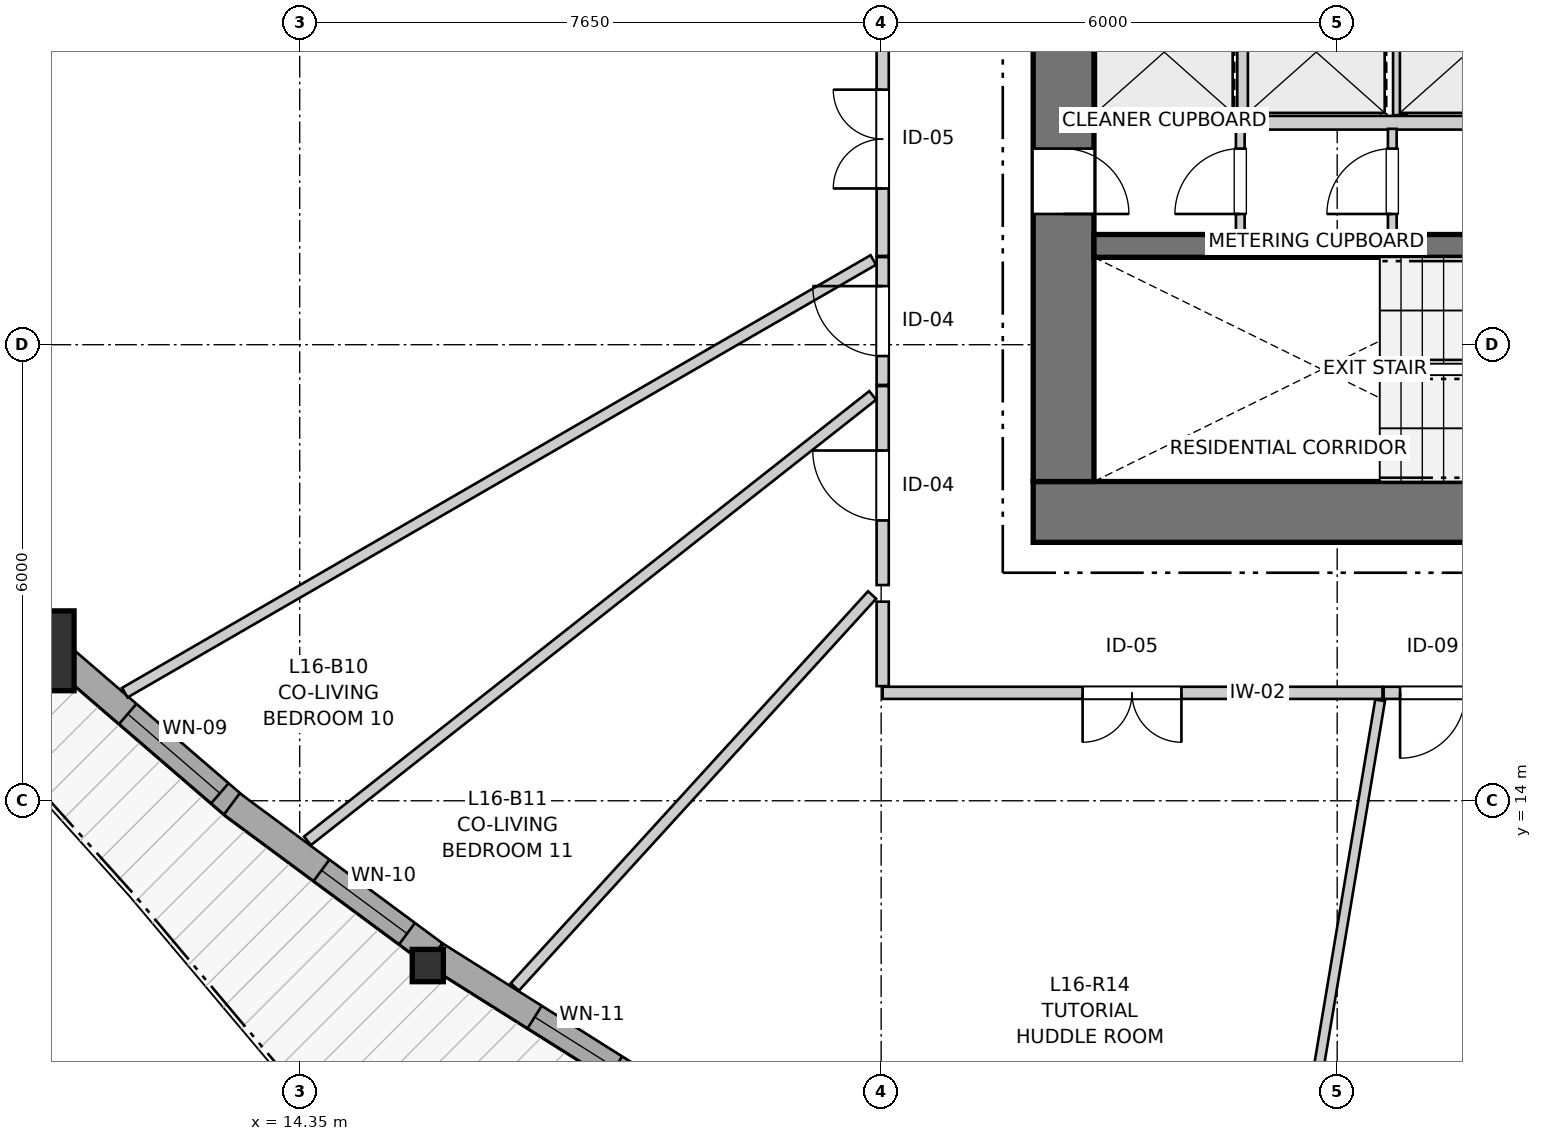
"""IFC4 building model, lengths in metres.
Left out: names, types, materials, properties, quantities, classifications, styles, units other than length and angle.
Written with IfcOpenShell. Run it as: python <this file> out.ifc"""

import sys

from ifc_helpers import new_model, si_unit, direction, frame, frame_2d, origin, origin_2d, place, context, subcontext, project, spatial, rectangle, i_section, extrude, source, transform, mapped, element, fill, save


model = new_model("IFC4")
c1 = context("Model", 3, precision=1e-05, world=origin(), true_north=direction((0.0, 1.0)))
c2 = subcontext(c1, "Body", "Model", "MODEL_VIEW")
j1 = project(units=[si_unit("LENGTHUNIT", "METRE"), si_unit("PLANEANGLEUNIT", "RADIAN")], contexts=[c1])
p1 = place(None, origin())
s1 = spatial("IfcSite", under=j1, at=p1, CompositionType="ELEMENT")
p2 = place(p1, origin())
s2 = spatial("IfcBuilding", under=s1, at=p2, CompositionType="ELEMENT")
p3 = place(p2, frame((0.0, 0.0, 55.8)))
s3 = spatial("IfcBuildingStorey", under=s2, at=p3, CompositionType="ELEMENT", Elevation=55.8)
p4 = place(p3, frame((24.0, 17.8, 0.0), z_axis=(0.0, 0.0, 1.0), x_axis=(1.0, 0.0, 0.0)))
e1 = element("IfcWall", 1, at=p4, inside=s3, PredefinedType="SHEAR", context=c2, shape_type="SweptSolid", body=[
    extrude(rectangle(XDim=12.7, YDim=0.8, at=frame_2d((6.35, 0.0))), origin(), (0.0, 0.0, 1.0), 2.94),
])
p5 = place(p3, frame((24.4, 33.8, 0.0), z_axis=(0.0, 0.0, 1.0), x_axis=(0.0, -1.0, 0.0)))
e2 = element("IfcWall", 2, at=p5, inside=s3, PredefinedType="SHEAR", context=c2, shape_type="SweptSolid", body=[
    extrude(rectangle(XDim=15.6, YDim=0.8, at=frame_2d((7.8, 0.0))), origin(), (0.0, 0.0, 1.0), 2.94),
])
p6 = place(p5, frame((7.05, 0.0, 0.0)))
e3 = element("IfcOpeningElement", 3, at=p6, cuts=e2, PredefinedType="OPENING", context=c2, shape_type="SweptSolid", body=[
    extrude(rectangle(XDim=1.5, YDim=2.15, at=frame_2d((0.75, 1.075))), frame((0.0, 0.41, 0.0), z_axis=(0.0, -1.0, 0.0), x_axis=(1.0, 0.0, 0.0)), (0.0, 0.0, 1.0), 0.82),
])
p7 = place(p5, frame((3.52, 0.0, 0.0)))
e4 = element("IfcOpeningElement", 4, at=p7, cuts=e2, PredefinedType="OPENING", context=c2, shape_type="SweptSolid", body=[
    extrude(rectangle(XDim=0.86, YDim=2.05, at=frame_2d((0.43, 1.025))), frame((0.0, 0.41, 0.0), z_axis=(0.0, -1.0, 0.0), x_axis=(1.0, 0.0, 0.0)), (0.0, 0.0, 1.0), 0.82),
])
p8 = place(p5, frame((11.22, 0.0, 0.0)))
e5 = element("IfcOpeningElement", 5, at=p8, cuts=e2, PredefinedType="OPENING", context=c2, shape_type="SweptSolid", body=[
    extrude(rectangle(XDim=0.86, YDim=2.05, at=frame_2d((0.43, 1.025))), frame((0.0, 0.41, 0.0), z_axis=(0.0, -1.0, 0.0), x_axis=(1.0, 0.0, 0.0)), (0.0, 0.0, 1.0), 0.82),
])
p9 = place(p3, frame((24.8, 21.3, 0.0), z_axis=(0.0, 0.0, 1.0), x_axis=(1.0, 0.0, 0.0)))
e6 = element("IfcWall", 6, at=p9, inside=s3, PredefinedType="SHEAR", context=c2, shape_type="SweptSolid", body=[
    extrude(rectangle(XDim=11.1, YDim=0.3, at=frame_2d((5.55, 0.0))), origin(), (0.0, 0.0, 1.0), 2.94),
])
p10 = place(p9, frame((6.22, 0.0, 0.0)))
e7 = element("IfcOpeningElement", 7, at=p10, cuts=e6, PredefinedType="OPENING", context=c2, shape_type="SweptSolid", body=[
    extrude(rectangle(XDim=0.98, YDim=2.15, at=frame_2d((0.49, 1.075))), frame((0.0, 0.16, 0.0), z_axis=(0.0, -1.0, 0.0), x_axis=(1.0, 0.0, 0.0)), (0.0, 0.0, 1.0), 0.32),
])
p11 = place(p9, frame((9.15, 0.0, 0.0)))
e8 = element("IfcOpeningElement", 8, at=p11, cuts=e6, PredefinedType="OPENING", context=c2, shape_type="SweptSolid", body=[
    extrude(rectangle(XDim=1.15, YDim=2.15, at=frame_2d((0.575, 1.075))), frame((0.0, 0.16, 0.0), z_axis=(0.0, -1.0, 0.0), x_axis=(1.0, 0.0, 0.0)), (0.0, 0.0, 1.0), 0.32),
])
m1 = source(origin(), c2, "Body", "SweptSolid", [
    extrude(rectangle(XDim=1.05, YDim=1.05, at=origin_2d()), origin(), (0.0, 0.0, 1.0), 2.94),
])
p12 = place(p3, frame((10.856, 15.973, 0.0), z_axis=(0.0, 0.0, 1.0), x_axis=(1.0, 0.0, 0.0)))
e9 = element("IfcColumn", 9, at=p12, inside=s3, PredefinedType="COLUMN", context=c2, shape_type="MappedRepresentation", body=[
    mapped(m1, transform((0.0, 0.0, 0.0), x_axis=(1.0, 0.0, 0.0), y_axis=(0.0, 1.0, 0.0), z_axis=(0.0, 0.0, 1.0), scale=1.0)),
])
m2 = source(origin(), c2, "Body", "SweptSolid", [
    extrude(i_section(OverallWidth=0.409, OverallDepth=0.425, WebThickness=0.03, FlangeThickness=0.048, FilletRadius=0.015, at=origin_2d()), origin(), (0.0, 0.0, 1.0), 2.94),
])
p13 = place(p3, frame((16.035, 11.832, 0.0), z_axis=(0.0, 0.0, 1.0), x_axis=(1.0, 0.0, 0.0)))
e10 = element("IfcColumn", 10, at=p13, inside=s3, PredefinedType="PILASTER", context=c2, shape_type="MappedRepresentation", body=[
    mapped(m2, transform((0.0, 0.0, 0.0), x_axis=(1.0, 0.0, 0.0), y_axis=(0.0, 1.0, 0.0), z_axis=(0.0, 0.0, 1.0), scale=1.0)),
])
p14 = place(p3, frame((11.198, 15.91, 0.0), z_axis=(0.0, 0.0, 1.0), x_axis=(0.757460062477, -0.652881500544, 0.0)))
e11 = element("IfcWall", 11, at=p14, inside=s3, PredefinedType="SOLIDWALL", context=c2, shape_type="SweptSolid", body=[
    extrude(rectangle(XDim=3.074, YDim=0.35, at=frame_2d((1.537, 0.0))), origin(), (0.0, 0.0, 1.0), 2.42),
])
p15 = place(p14, frame((1.175, 0.0, 0.82)))
e12 = element("IfcOpeningElement", 12, at=p15, cuts=e11, PredefinedType="OPENING", context=c2, shape_type="SweptSolid", body=[
    extrude(rectangle(XDim=1.6, YDim=1.35, at=frame_2d((0.8, 0.675))), frame((0.0, 0.185, 0.0), z_axis=(0.0, -1.0, 0.0), x_axis=(1.0, 0.0, 0.0)), (0.0, 0.0, 1.0), 0.37),
])
p16 = place(p3, frame((13.457, 13.958, 0.0), z_axis=(0.0, 0.0, 1.0), x_axis=(0.803790514758, -0.594912437578, 0.0)))
e13 = element("IfcWall", 13, at=p16, inside=s3, PredefinedType="SOLIDWALL", context=c2, shape_type="SweptSolid", body=[
    extrude(rectangle(XDim=3.317, YDim=0.35, at=frame_2d((1.659, 0.0))), origin(), (0.0, 0.0, 1.0), 2.42),
])
p17 = place(p16, frame((1.468, 0.0, 0.82)))
e14 = element("IfcOpeningElement", 14, at=p17, cuts=e13, PredefinedType="OPENING", context=c2, shape_type="SweptSolid", body=[
    extrude(rectangle(XDim=1.4, YDim=1.35, at=frame_2d((0.7, 0.675))), frame((0.0, 0.185, 0.0), z_axis=(0.0, -1.0, 0.0), x_axis=(1.0, 0.0, 0.0)), (0.0, 0.0, 1.0), 0.37),
])
p18 = place(p3, frame((16.146, 11.97, 0.0), z_axis=(0.0, 0.0, 1.0), x_axis=(0.846405860611, -0.532538373381, 0.0)))
e15 = element("IfcWall", 15, at=p18, inside=s3, PredefinedType="SOLIDWALL", context=c2, shape_type="SweptSolid", body=[
    extrude(rectangle(XDim=3.298, YDim=0.35, at=frame_2d((1.649, 0.0))), origin(), (0.0, 0.0, 1.0), 2.42),
])
p19 = place(p18, frame((1.531, 0.0, 0.82)))
e16 = element("IfcOpeningElement", 16, at=p19, cuts=e15, PredefinedType="OPENING", context=c2, shape_type="SweptSolid", body=[
    extrude(rectangle(XDim=1.25, YDim=1.35, at=frame_2d((0.625, 0.675))), frame((0.0, 0.185, 0.0), z_axis=(0.0, -1.0, 0.0), x_axis=(1.0, 0.0, 0.0)), (0.0, 0.0, 1.0), 0.37),
])
p20 = place(p3, frame((24.81, 22.92, 0.0), z_axis=(0.0, 0.0, 1.0), x_axis=(1.0, 0.0, 0.0)))
e17 = element("IfcWall", 17, at=p20, inside=s3, PredefinedType="PARTITIONING", context=c2, shape_type="SweptSolid", body=[
    extrude(rectangle(XDim=5.84, YDim=0.18, at=frame_2d((2.92, 0.0))), origin(), (0.0, 0.0, 1.0), 2.94),
])
for number, where, z_axis, x_axis in (
    (18, (26.775, 23.02, 0.0), (0.0, 0.0, 1.0), (0.0, 1.0, 0.0)),
    (19, (28.825, 23.02, 0.0), (0.0, 0.0, 1.0), (0.0, 1.0, 0.0)),
):
    element("IfcWall", number, at=place(p3, frame(where, z_axis=z_axis, x_axis=x_axis)), inside=s3, PredefinedType="PARTITIONING", context=c2, shape_type="SweptSolid", body=[
        extrude(rectangle(XDim=1.78, YDim=0.18, at=frame_2d((0.89, 0.0))), origin(), (0.0, 0.0, 1.0), 2.94),
    ])
p21 = place(p3, frame((26.725, 21.46, 0.0), z_axis=(0.0, 0.0, 1.0), x_axis=(0.0, 1.0, 0.0)))
e20 = element("IfcWall", 20, at=p21, inside=s3, PredefinedType="PARTITIONING", context=c2, shape_type="SweptSolid", body=[
    extrude(rectangle(XDim=1.38, YDim=0.115, at=frame_2d((0.69, 0.0))), origin(), (0.0, 0.0, 1.0), 2.94),
])
p22 = place(p21, frame((0.26, 0.0, 0.0)))
e21 = element("IfcOpeningElement", 21, at=p22, cuts=e20, PredefinedType="OPENING", context=c2, shape_type="SweptSolid", body=[
    extrude(rectangle(XDim=0.86, YDim=2.05, at=frame_2d((0.43, 1.025))), frame((0.0, 0.067, 0.0), z_axis=(0.0, -1.0, 0.0), x_axis=(1.0, 0.0, 0.0)), (0.0, 0.0, 1.0), 0.135),
])
p23 = place(p3, frame((28.725, 21.46, 0.0), z_axis=(0.0, 0.0, 1.0), x_axis=(0.0, 1.0, 0.0)))
e22 = element("IfcWall", 22, at=p23, inside=s3, PredefinedType="PARTITIONING", context=c2, shape_type="SweptSolid", body=[
    extrude(rectangle(XDim=1.38, YDim=0.115, at=frame_2d((0.69, 0.0))), origin(), (0.0, 0.0, 1.0), 2.94),
])
p24 = place(p23, frame((0.26, 0.0, 0.0)))
e23 = element("IfcOpeningElement", 23, at=p24, cuts=e22, PredefinedType="OPENING", context=c2, shape_type="SweptSolid", body=[
    extrude(rectangle(XDim=0.86, YDim=2.05, at=frame_2d((0.43, 1.025))), frame((0.0, 0.067, 0.0), z_axis=(0.0, -1.0, 0.0), x_axis=(1.0, 0.0, 0.0)), (0.0, 0.0, 1.0), 0.135),
])
p25 = place(p3, frame((28.596, 15.42, 0.0), z_axis=(0.0, 0.0, 1.0), x_axis=(-1.0, 0.0, 0.0)))
e24 = element("IfcWall", 24, at=p25, inside=s3, PredefinedType="PARTITIONING", context=c2, shape_type="SweptSolid", body=[
    extrude(rectangle(XDim=6.576, YDim=0.16, at=frame_2d((3.288, 0.0))), origin(), (0.0, 0.0, 1.0), 2.94),
])
p26 = place(p25, frame((2.646, 0.0, 0.0)))
e25 = element("IfcOpeningElement", 25, at=p26, cuts=e24, PredefinedType="OPENING", context=c2, shape_type="SweptSolid", body=[
    extrude(rectangle(XDim=1.3, YDim=2.1, at=frame_2d((0.65, 1.05))), frame((0.0, 0.09, 0.0), z_axis=(0.0, -1.0, 0.0), x_axis=(1.0, 0.0, 0.0)), (0.0, 0.0, 1.0), 0.18),
])
p27 = place(p3, frame((22.02, 21.168, 0.0), z_axis=(0.0, 0.0, 1.0), x_axis=(0.0, 1.0, 0.0)))
e26 = element("IfcWall", 26, at=p27, inside=s3, PredefinedType="PARTITIONING", context=c2, shape_type="SweptSolid", body=[
    extrude(rectangle(XDim=2.982, YDim=0.16, at=frame_2d((1.491, 0.0))), origin(), (0.0, 0.0, 1.0), 2.94),
])
p28 = place(p27, frame((0.887, 0.0, 0.0)))
e27 = element("IfcOpeningElement", 27, at=p28, cuts=e26, PredefinedType="OPENING", context=c2, shape_type="SweptSolid", body=[
    extrude(rectangle(XDim=1.3, YDim=2.1, at=frame_2d((0.65, 1.05))), frame((0.0, 0.09, 0.0), z_axis=(0.0, -1.0, 0.0), x_axis=(1.0, 0.0, 0.0)), (0.0, 0.0, 1.0), 0.18),
])
p29 = place(p3, frame((22.02, 16.838, 0.0), z_axis=(0.0, 0.0, 1.0), x_axis=(0.0, 1.0, 0.0)))
e28 = element("IfcWall", 28, at=p29, inside=s3, PredefinedType="PARTITIONING", context=c2, shape_type="SweptSolid", body=[
    extrude(rectangle(XDim=2.618, YDim=0.16, at=frame_2d((1.309, 0.0))), origin(), (0.0, 0.0, 1.0), 2.94),
])
p30 = place(p29, frame((0.85, 0.0, 0.0)))
e29 = element("IfcOpeningElement", 29, at=p30, cuts=e28, PredefinedType="OPENING", context=c2, shape_type="SweptSolid", body=[
    extrude(rectangle(XDim=0.92, YDim=2.1, at=frame_2d((0.46, 1.05))), frame((0.0, 0.09, 0.0), z_axis=(0.0, -1.0, 0.0), x_axis=(1.0, 0.0, 0.0)), (0.0, 0.0, 1.0), 0.18),
])
p31 = place(p3, frame((22.02, 19.471, 0.0), z_axis=(0.0, 0.0, 1.0), x_axis=(0.0, 1.0, 0.0)))
e30 = element("IfcWall", 30, at=p31, inside=s3, PredefinedType="PARTITIONING", context=c2, shape_type="SweptSolid", body=[
    extrude(rectangle(XDim=1.682, YDim=0.16, at=frame_2d((0.841, 0.0))), origin(), (0.0, 0.0, 1.0), 2.94),
])
p32 = place(p31, frame((0.38, 0.0, 0.0)))
e31 = element("IfcOpeningElement", 31, at=p32, cuts=e30, PredefinedType="OPENING", context=c2, shape_type="SweptSolid", body=[
    extrude(rectangle(XDim=0.92, YDim=2.1, at=frame_2d((0.46, 1.05))), frame((0.0, 0.09, 0.0), z_axis=(0.0, -1.0, 0.0), x_axis=(1.0, 0.0, 0.0)), (0.0, 0.0, 1.0), 0.18),
])
p33 = place(p3, frame((29.949, 15.42, 0.0), z_axis=(0.0, 0.0, 1.0), x_axis=(-1.0, 0.0, 0.0)))
e32 = element("IfcWall", 32, at=p33, inside=s3, PredefinedType="PARTITIONING", context=c2, shape_type="SweptSolid", body=[
    extrude(rectangle(XDim=1.338, YDim=0.16, at=frame_2d((0.669, 0.0))), origin(), (0.0, 0.0, 1.0), 2.94),
])
p34 = place(p33, frame((0.261, 0.0, 0.0)))
e33 = element("IfcOpeningElement", 33, at=p34, cuts=e32, PredefinedType="OPENING", context=c2, shape_type="SweptSolid", body=[
    extrude(rectangle(XDim=0.86, YDim=2.05, at=frame_2d((0.43, 1.025))), frame((0.0, 0.09, 0.0), z_axis=(0.0, -1.0, 0.0), x_axis=(1.0, 0.0, 0.0)), (0.0, 0.0, 1.0), 0.18),
])
p35 = place(p3, frame((12.049, 15.422, 0.0), z_axis=(0.0, 0.0, 1.0), x_axis=(0.865775806306, 0.500432066534, 0.0)))
e34 = element("IfcWall", 34, at=p35, inside=s3, PredefinedType="PARTITIONING", context=c2, shape_type="SweptSolid", body=[
    extrude(rectangle(XDim=11.375, YDim=0.145, at=frame_2d((5.688, 0.0))), origin(), (0.0, 0.0, 1.0), 2.94),
])
p36 = place(p3, frame((14.452, 13.473, 0.0), z_axis=(0.0, 0.0, 1.0), x_axis=(0.785461283481, 0.618910794988, 0.0)))
e35 = element("IfcWall", 35, at=p36, inside=s3, PredefinedType="PARTITIONING", context=c2, shape_type="SweptSolid", body=[
    extrude(rectangle(XDim=9.468, YDim=0.145, at=frame_2d((4.734, 0.0))), origin(), (0.0, 0.0, 1.0), 2.94),
])
p37 = place(p3, frame((29.567, 6.072, 0.0), z_axis=(0.0, 0.0, 1.0), x_axis=(0.039185050788, 0.999231970963, 0.0)))
e36 = element("IfcWall", 36, at=p37, inside=s3, PredefinedType="PARTITIONING", context=c2, shape_type="SweptSolid", body=[
    extrude(rectangle(XDim=9.265, YDim=0.13, at=frame_2d((4.632, 0.0))), origin(), (0.0, 0.0, 1.0), 2.94),
])
p38 = place(p3, frame((27.139, 6.792, 0.0), z_axis=(0.0, 0.0, 1.0), x_axis=(0.164847632872, 0.986319044699, 0.0)))
e37 = element("IfcWall", 37, at=p38, inside=s3, PredefinedType="PARTITIONING", context=c2, shape_type="SweptSolid", body=[
    extrude(rectangle(XDim=8.648, YDim=0.13, at=frame_2d((4.324, 0.0))), origin(), (0.0, 0.0, 1.0), 2.94),
])
p39 = place(p3, frame((17.18, 11.55, 0.0), z_axis=(0.0, 0.0, 1.0), x_axis=(0.673657773225, 0.739043438895, 0.0)))
e38 = element("IfcWall", 38, at=p39, inside=s3, PredefinedType="PARTITIONING", context=c2, shape_type="SweptSolid", body=[
    extrude(rectangle(XDim=6.979, YDim=0.145, at=frame_2d((3.489, 0.0))), origin(), (0.0, 0.0, 1.0), 2.94),
])
p40 = place(p3, frame((22.02, 15.508, 0.0), z_axis=(0.0, 0.0, 1.0), x_axis=(0.0, 1.0, 0.0)))
e39 = element("IfcWall", 39, at=p40, inside=s3, PredefinedType="PARTITIONING", context=c2, shape_type="SweptSolid", body=[
    extrude(rectangle(XDim=1.112, YDim=0.16, at=frame_2d((0.556, 0.0))), origin(), (0.0, 0.0, 1.0), 2.94),
])
m3 = source(origin(), c2, "Body", "SweptSolid", [
    extrude(rectangle(XDim=1.6, YDim=1.35, at=frame_2d((0.8, 0.675))), frame((0.0, 0.03, 0.0), z_axis=(0.0, -1.0, 0.0), x_axis=(1.0, 0.0, 0.0)), (0.0, 0.0, 1.0), 0.06),
])
p41 = place(p15, origin())
e40 = element("IfcWindow", 40, at=p41, inside=s3, PartitioningType="SINGLE_PANEL", PredefinedType="WINDOW", context=c2, shape_type="MappedRepresentation", body=[
    mapped(m3, transform((0.0, 0.0, 0.0), x_axis=(1.0, 0.0, 0.0), y_axis=(0.0, 1.0, 0.0), z_axis=(0.0, 0.0, 1.0), scale=1.0)),
])
fill(e12, e40)
m4 = source(origin(), c2, "Body", "SweptSolid", [
    extrude(rectangle(XDim=1.4, YDim=1.35, at=frame_2d((0.7, 0.675))), frame((0.0, 0.03, 0.0), z_axis=(0.0, -1.0, 0.0), x_axis=(1.0, 0.0, 0.0)), (0.0, 0.0, 1.0), 0.06),
])
p42 = place(p17, origin())
e41 = element("IfcWindow", 41, at=p42, inside=s3, PartitioningType="SINGLE_PANEL", PredefinedType="WINDOW", context=c2, shape_type="MappedRepresentation", body=[
    mapped(m4, transform((0.0, 0.0, 0.0), x_axis=(1.0, 0.0, 0.0), y_axis=(0.0, 1.0, 0.0), z_axis=(0.0, 0.0, 1.0), scale=1.0)),
])
fill(e14, e41)
m5 = source(origin(), c2, "Body", "SweptSolid", [
    extrude(rectangle(XDim=1.25, YDim=1.35, at=frame_2d((0.625, 0.675))), frame((0.0, 0.03, 0.0), z_axis=(0.0, -1.0, 0.0), x_axis=(1.0, 0.0, 0.0)), (0.0, 0.0, 1.0), 0.06),
])
p43 = place(p19, origin())
e42 = element("IfcWindow", 42, at=p43, inside=s3, PartitioningType="SINGLE_PANEL", PredefinedType="WINDOW", context=c2, shape_type="MappedRepresentation", body=[
    mapped(m5, transform((0.0, 0.0, 0.0), x_axis=(1.0, 0.0, 0.0), y_axis=(0.0, 1.0, 0.0), z_axis=(0.0, 0.0, 1.0), scale=1.0)),
])
fill(e16, e42)
m6 = source(origin(), c2, "Body", "SweptSolid", [
    extrude(rectangle(XDim=0.86, YDim=2.05, at=frame_2d((0.43, 1.025))), frame((0.0, 0.025, 0.0), z_axis=(0.0, -1.0, 0.0), x_axis=(1.0, 0.0, 0.0)), (0.0, 0.0, 1.0), 0.05),
])
p44 = place(p8, origin())
e43 = element("IfcDoor", 43, at=p44, inside=s3, OperationType="SINGLE_SWING_RIGHT", PredefinedType="DOOR", context=c2, shape_type="MappedRepresentation", body=[
    mapped(m6, transform((0.0, 0.0, 0.0), x_axis=(1.0, 0.0, 0.0), y_axis=(0.0, 1.0, 0.0), z_axis=(0.0, 0.0, 1.0), scale=1.0)),
])
fill(e5, e43)
p45 = place(p22, origin())
e44 = element("IfcDoor", 44, at=p45, inside=s3, OperationType="SINGLE_SWING_LEFT", PredefinedType="DOOR", context=c2, shape_type="MappedRepresentation", body=[
    mapped(m6, transform((0.0, 0.0, 0.0), x_axis=(1.0, 0.0, 0.0), y_axis=(0.0, 1.0, 0.0), z_axis=(0.0, 0.0, 1.0), scale=1.0)),
])
fill(e21, e44)
p46 = place(p24, origin())
e45 = element("IfcDoor", 45, at=p46, inside=s3, OperationType="SINGLE_SWING_LEFT", PredefinedType="DOOR", context=c2, shape_type="MappedRepresentation", body=[
    mapped(m6, transform((0.0, 0.0, 0.0), x_axis=(1.0, 0.0, 0.0), y_axis=(0.0, 1.0, 0.0), z_axis=(0.0, 0.0, 1.0), scale=1.0)),
])
fill(e23, e45)
m7 = source(origin(), c2, "Body", "SweptSolid", [
    extrude(rectangle(XDim=1.3, YDim=2.1, at=frame_2d((0.65, 1.05))), frame((0.0, 0.025, 0.0), z_axis=(0.0, -1.0, 0.0), x_axis=(1.0, 0.0, 0.0)), (0.0, 0.0, 1.0), 0.05),
])
p47 = place(p26, origin())
e46 = element("IfcDoor", 46, at=p47, inside=s3, OperationType="DOUBLE_DOOR_SINGLE_SWING", PredefinedType="DOOR", context=c2, shape_type="MappedRepresentation", body=[
    mapped(m7, transform((0.0, 0.0, 0.0), x_axis=(1.0, 0.0, 0.0), y_axis=(0.0, 1.0, 0.0), z_axis=(0.0, 0.0, 1.0), scale=1.0)),
])
fill(e25, e46)
p48 = place(p28, origin())
e47 = element("IfcDoor", 47, at=p48, inside=s3, OperationType="DOUBLE_DOOR_SINGLE_SWING", PredefinedType="DOOR", context=c2, shape_type="MappedRepresentation", body=[
    mapped(m7, transform((0.0, 0.0, 0.0), x_axis=(1.0, 0.0, 0.0), y_axis=(0.0, 1.0, 0.0), z_axis=(0.0, 0.0, 1.0), scale=1.0)),
])
fill(e27, e47)
m8 = source(origin(), c2, "Body", "SweptSolid", [
    extrude(rectangle(XDim=0.92, YDim=2.1, at=frame_2d((0.46, 1.05))), frame((0.0, 0.025, 0.0), z_axis=(0.0, -1.0, 0.0), x_axis=(1.0, 0.0, 0.0)), (0.0, 0.0, 1.0), 0.05),
])
p49 = place(p30, origin())
e48 = element("IfcDoor", 48, at=p49, inside=s3, OperationType="SINGLE_SWING_RIGHT", PredefinedType="DOOR", context=c2, shape_type="MappedRepresentation", body=[
    mapped(m8, transform((0.0, 0.0, 0.0), x_axis=(1.0, 0.0, 0.0), y_axis=(0.0, 1.0, 0.0), z_axis=(0.0, 0.0, 1.0), scale=1.0)),
])
fill(e29, e48)
p50 = place(p32, origin())
e49 = element("IfcDoor", 49, at=p50, inside=s3, OperationType="SINGLE_SWING_RIGHT", PredefinedType="DOOR", context=c2, shape_type="MappedRepresentation", body=[
    mapped(m8, transform((0.0, 0.0, 0.0), x_axis=(1.0, 0.0, 0.0), y_axis=(0.0, 1.0, 0.0), z_axis=(0.0, 0.0, 1.0), scale=1.0)),
])
fill(e31, e49)
p51 = place(p34, origin())
e50 = element("IfcDoor", 50, at=p51, inside=s3, OperationType="SINGLE_SWING_RIGHT", PredefinedType="DOOR", context=c2, shape_type="MappedRepresentation", body=[
    mapped(m6, transform((0.0, 0.0, 0.0), x_axis=(1.0, 0.0, 0.0), y_axis=(0.0, 1.0, 0.0), z_axis=(0.0, 0.0, 1.0), scale=1.0)),
])
fill(e33, e50)
save(model, sys.argv[1])
